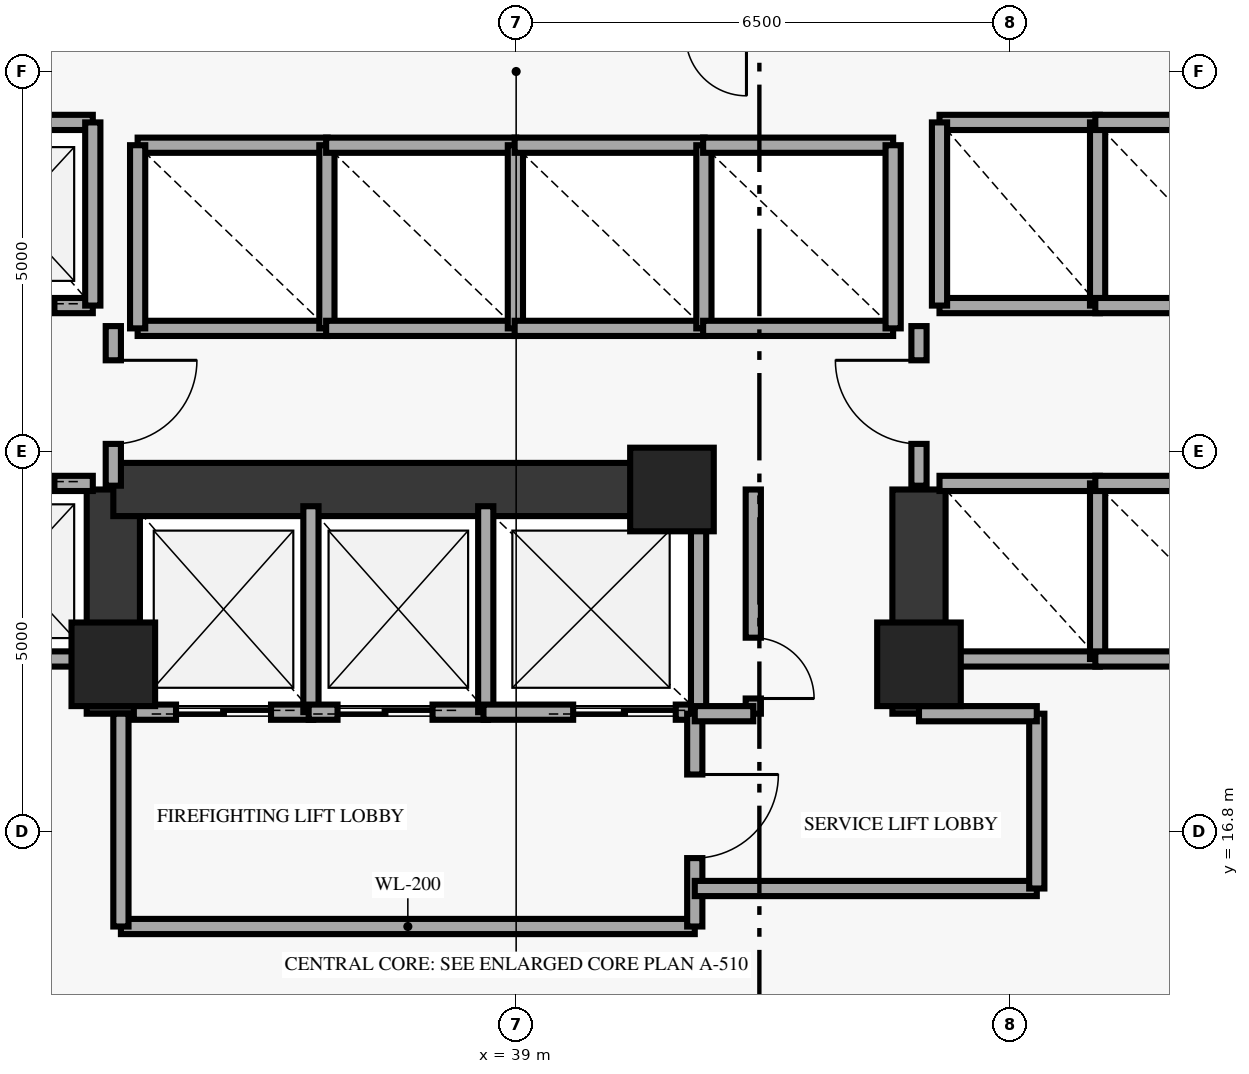
"""IFC4 building model, lengths in metres.
Left out: names, types, materials, properties, quantities, classifications, styles, units other than length and angle.
Written with IfcOpenShell. Run it as: python <this file> out.ifc"""

import sys

from ifc_helpers import new_model, si_unit, direction, frame, frame_2d, origin, origin_2d, place, context, subcontext, project, spatial, rectangle, extrude, element, fill, save


model = new_model("IFC4")
c1 = context("Model", 3, precision=1e-05, world=origin(), true_north=direction((0.0, 1.0)))
c2 = subcontext(c1, "Body", "Model", "MODEL_VIEW")
j1 = project(units=[si_unit("LENGTHUNIT", "METRE"), si_unit("PLANEANGLEUNIT", "RADIAN")], contexts=[c1])
p1 = place(None, origin())
s1 = spatial("IfcSite", under=j1, at=p1, CompositionType="ELEMENT")
p2 = place(p1, origin())
s2 = spatial("IfcBuilding", under=s1, at=p2, CompositionType="ELEMENT")
p3 = place(p2, frame((0.0, 0.0, 102.0)))
s3 = spatial("IfcBuildingStorey", under=s2, at=p3, CompositionType="ELEMENT", Elevation=102.0)
for number, where, z_axis, x_axis in (
    (1, (33.7, 19.0, 0.0), (0.0, 0.0, 1.0), (1.0, 0.0, 0.0)),
    (2, (41.05, 21.3, 0.0), (0.0, 0.0, 1.0), (1.0, 0.0, 0.0)),
    (3, (44.3, 19.0, 0.0), (0.0, 0.0, 1.0), (1.0, 0.0, 0.0)),
):
    element("IfcColumn", number, at=place(p3, frame(where, z_axis=z_axis, x_axis=x_axis)), inside=s3, PredefinedType="PILASTER", context=c2, shape_type="SweptSolid", body=[
        extrude(rectangle(XDim=1.1, YDim=1.1, at=origin_2d()), origin(), (0.0, 0.0, 1.0), 3.7),
    ])
for number, where, z_axis, x_axis in (
    (4, (33.7, 18.35, 0.0), (0.0, 0.0, 1.0), (0.0, 1.0, 0.0)),
    (5, (44.3, 18.35, 0.0), (0.0, 0.0, 1.0), (0.0, 1.0, 0.0)),
):
    element("IfcWall", number, at=place(p3, frame(where, z_axis=z_axis, x_axis=x_axis)), inside=s3, PredefinedType="SHEAR", context=c2, shape_type="SweptSolid", body=[
        extrude(rectangle(XDim=2.95, YDim=0.7, at=frame_2d((1.475, 0.0))), origin(), (0.0, 0.0, 1.0), 3.7),
    ])
p4 = place(p3, frame((33.7, 21.3, 0.0), z_axis=(0.0, 0.0, 1.0), x_axis=(1.0, 0.0, 0.0)))
e6 = element("IfcWall", 6, at=p4, inside=s3, PredefinedType="SHEAR", context=c2, shape_type="SweptSolid", body=[
    extrude(rectangle(XDim=7.55, YDim=0.7, at=frame_2d((3.775, 0.0))), origin(), (0.0, 0.0, 1.0), 3.7),
])
p5 = place(p3, frame((31.32, 23.72, 0.0), z_axis=(0.0, 0.0, 1.0), x_axis=(1.0, 0.0, 0.0)))
e7 = element("IfcWall", 7, at=p5, inside=s3, PredefinedType="SOLIDWALL", context=c2, shape_type="SweptSolid", body=[
    extrude(rectangle(XDim=2.11, YDim=0.2, at=frame_2d((1.055, 0.0))), origin(), (0.0, 0.0, 1.0), 3.7),
])
p6 = place(p5, frame((0.505, 0.0, 0.0)))
e8 = element("IfcOpeningElement", 8, at=p6, cuts=e7, PredefinedType="OPENING", context=c2, shape_type="SweptSolid", body=[
    extrude(rectangle(XDim=1.1, YDim=2.15, at=frame_2d((0.55, 1.075))), frame((0.0, 0.11, 0.0), z_axis=(0.0, -1.0, 0.0), x_axis=(1.0, 0.0, 0.0)), (0.0, 0.0, 1.0), 0.22),
])
p7 = place(p3, frame((31.32, 26.13, 0.0), z_axis=(0.0, 0.0, 1.0), x_axis=(1.0, 0.0, 0.0)))
e9 = element("IfcWall", 9, at=p7, inside=s3, PredefinedType="SOLIDWALL", context=c2, shape_type="SweptSolid", body=[
    extrude(rectangle(XDim=2.11, YDim=0.2, at=frame_2d((1.055, 0.0))), origin(), (0.0, 0.0, 1.0), 3.7),
])
p8 = place(p3, frame((33.43, 23.72, 0.0), z_axis=(0.0, 0.0, 1.0), x_axis=(0.0, 1.0, 0.0)))
e10 = element("IfcWall", 10, at=p8, inside=s3, PredefinedType="SOLIDWALL", context=c2, shape_type="SweptSolid", body=[
    extrude(rectangle(XDim=2.41, YDim=0.2, at=frame_2d((1.205, 0.0))), origin(), (0.0, 0.0, 1.0), 3.7),
])
p9 = place(p3, frame((31.32, 19.07, 0.0), z_axis=(0.0, 0.0, 1.0), x_axis=(1.0, 0.0, 0.0)))
e11 = element("IfcWall", 11, at=p9, inside=s3, PredefinedType="SOLIDWALL", context=c2, shape_type="SweptSolid", body=[
    extrude(rectangle(XDim=2.11, YDim=0.2, at=frame_2d((1.055, 0.0))), origin(), (0.0, 0.0, 1.0), 3.7),
])
p10 = place(p3, frame((31.32, 21.38, 0.0), z_axis=(0.0, 0.0, 1.0), x_axis=(1.0, 0.0, 0.0)))
e12 = element("IfcWall", 12, at=p10, inside=s3, PredefinedType="SOLIDWALL", context=c2, shape_type="SweptSolid", body=[
    extrude(rectangle(XDim=2.11, YDim=0.2, at=frame_2d((1.055, 0.0))), origin(), (0.0, 0.0, 1.0), 3.7),
])
p11 = place(p10, frame((0.505, 0.0, 0.0)))
e13 = element("IfcOpeningElement", 13, at=p11, cuts=e12, PredefinedType="OPENING", context=c2, shape_type="SweptSolid", body=[
    extrude(rectangle(XDim=1.1, YDim=2.15, at=frame_2d((0.55, 1.075))), frame((0.0, 0.11, 0.0), z_axis=(0.0, -1.0, 0.0), x_axis=(1.0, 0.0, 0.0)), (0.0, 0.0, 1.0), 0.22),
])
for number, where, z_axis, x_axis in (
    (14, (44.57, 23.72, 0.0), (0.0, 0.0, 1.0), (1.0, 0.0, 0.0)),
    (15, (44.57, 26.13, 0.0), (0.0, 0.0, 1.0), (1.0, 0.0, 0.0)),
):
    element("IfcWall", number, at=place(p3, frame(where, z_axis=z_axis, x_axis=x_axis)), inside=s3, PredefinedType="SOLIDWALL", context=c2, shape_type="SweptSolid", body=[
        extrude(rectangle(XDim=2.11, YDim=0.2, at=frame_2d((1.055, 0.0))), origin(), (0.0, 0.0, 1.0), 3.7),
    ])
for number, where, z_axis, x_axis in (
    (16, (44.57, 23.72, 0.0), (0.0, 0.0, 1.0), (0.0, 1.0, 0.0)),
    (17, (46.65, 23.72, 0.0), (0.0, 0.0, 1.0), (0.0, 1.0, 0.0)),
):
    element("IfcWall", number, at=place(p3, frame(where, z_axis=z_axis, x_axis=x_axis)), inside=s3, PredefinedType="SOLIDWALL", context=c2, shape_type="SweptSolid", body=[
        extrude(rectangle(XDim=2.41, YDim=0.2, at=frame_2d((1.205, 0.0))), origin(), (0.0, 0.0, 1.0), 3.7),
    ])
for number, where, z_axis, x_axis in (
    (18, (46.62, 23.72, 0.0), (0.0, 0.0, 1.0), (1.0, 0.0, 0.0)),
    (19, (46.62, 26.13, 0.0), (0.0, 0.0, 1.0), (1.0, 0.0, 0.0)),
):
    element("IfcWall", number, at=place(p3, frame(where, z_axis=z_axis, x_axis=x_axis)), inside=s3, PredefinedType="SOLIDWALL", context=c2, shape_type="SweptSolid", body=[
        extrude(rectangle(XDim=2.31, YDim=0.2, at=frame_2d((1.155, 0.0))), origin(), (0.0, 0.0, 1.0), 3.7),
    ])
for number, where, z_axis, x_axis in (
    (20, (44.57, 19.07, 0.0), (0.0, 0.0, 1.0), (1.0, 0.0, 0.0)),
    (21, (44.57, 21.38, 0.0), (0.0, 0.0, 1.0), (1.0, 0.0, 0.0)),
):
    element("IfcWall", number, at=place(p3, frame(where, z_axis=z_axis, x_axis=x_axis)), inside=s3, PredefinedType="SOLIDWALL", context=c2, shape_type="SweptSolid", body=[
        extrude(rectangle(XDim=2.11, YDim=0.2, at=frame_2d((1.055, 0.0))), origin(), (0.0, 0.0, 1.0), 3.7),
    ])
for number, where, z_axis, x_axis in (
    (22, (46.65, 19.07, 0.0), (0.0, 0.0, 1.0), (0.0, 1.0, 0.0)),
    (23, (46.62, 19.07, 0.0), (0.0, 0.0, 1.0), (1.0, 0.0, 0.0)),
    (24, (46.62, 21.38, 0.0), (0.0, 0.0, 1.0), (1.0, 0.0, 0.0)),
):
    element("IfcWall", number, at=place(p3, frame(where, z_axis=z_axis, x_axis=x_axis)), inside=s3, PredefinedType="SOLIDWALL", context=c2, shape_type="SweptSolid", body=[
        extrude(rectangle(XDim=2.31, YDim=0.2, at=frame_2d((1.155, 0.0))), origin(), (0.0, 0.0, 1.0), 3.7),
    ])
for number, where, z_axis, x_axis in (
    (25, (34.02, 23.42, 0.0), (0.0, 0.0, 1.0), (1.0, 0.0, 0.0)),
    (26, (34.02, 25.83, 0.0), (0.0, 0.0, 1.0), (1.0, 0.0, 0.0)),
):
    element("IfcWall", number, at=place(p3, frame(where, z_axis=z_axis, x_axis=x_axis)), inside=s3, PredefinedType="SOLIDWALL", context=c2, shape_type="SweptSolid", body=[
        extrude(rectangle(XDim=2.5, YDim=0.2, at=frame_2d((1.25, 0.0))), origin(), (0.0, 0.0, 1.0), 3.7),
    ])
for number, where, z_axis, x_axis in (
    (27, (34.02, 23.42, 0.0), (0.0, 0.0, 1.0), (0.0, 1.0, 0.0)),
    (28, (36.51, 23.42, 0.0), (0.0, 0.0, 1.0), (0.0, 1.0, 0.0)),
):
    element("IfcWall", number, at=place(p3, frame(where, z_axis=z_axis, x_axis=x_axis)), inside=s3, PredefinedType="SOLIDWALL", context=c2, shape_type="SweptSolid", body=[
        extrude(rectangle(XDim=2.41, YDim=0.2, at=frame_2d((1.205, 0.0))), origin(), (0.0, 0.0, 1.0), 3.7),
    ])
for number, where, z_axis, x_axis in (
    (29, (36.5, 23.42, 0.0), (0.0, 0.0, 1.0), (1.0, 0.0, 0.0)),
    (30, (36.5, 25.83, 0.0), (0.0, 0.0, 1.0), (1.0, 0.0, 0.0)),
):
    element("IfcWall", number, at=place(p3, frame(where, z_axis=z_axis, x_axis=x_axis)), inside=s3, PredefinedType="SOLIDWALL", context=c2, shape_type="SweptSolid", body=[
        extrude(rectangle(XDim=2.5, YDim=0.2, at=frame_2d((1.25, 0.0))), origin(), (0.0, 0.0, 1.0), 3.7),
    ])
p12 = place(p3, frame((38.99, 23.42, 0.0), z_axis=(0.0, 0.0, 1.0), x_axis=(0.0, 1.0, 0.0)))
e31 = element("IfcWall", 31, at=p12, inside=s3, PredefinedType="SOLIDWALL", context=c2, shape_type="SweptSolid", body=[
    extrude(rectangle(XDim=2.41, YDim=0.2, at=frame_2d((1.205, 0.0))), origin(), (0.0, 0.0, 1.0), 3.7),
])
for number, where, z_axis, x_axis in (
    (32, (38.98, 23.42, 0.0), (0.0, 0.0, 1.0), (1.0, 0.0, 0.0)),
    (33, (38.98, 25.83, 0.0), (0.0, 0.0, 1.0), (1.0, 0.0, 0.0)),
):
    element("IfcWall", number, at=place(p3, frame(where, z_axis=z_axis, x_axis=x_axis)), inside=s3, PredefinedType="SOLIDWALL", context=c2, shape_type="SweptSolid", body=[
        extrude(rectangle(XDim=2.5, YDim=0.2, at=frame_2d((1.25, 0.0))), origin(), (0.0, 0.0, 1.0), 3.7),
    ])
p13 = place(p3, frame((41.47, 23.42, 0.0), z_axis=(0.0, 0.0, 1.0), x_axis=(0.0, 1.0, 0.0)))
e34 = element("IfcWall", 34, at=p13, inside=s3, PredefinedType="SOLIDWALL", context=c2, shape_type="SweptSolid", body=[
    extrude(rectangle(XDim=2.41, YDim=0.2, at=frame_2d((1.205, 0.0))), origin(), (0.0, 0.0, 1.0), 3.7),
])
for number, where, z_axis, x_axis in (
    (35, (41.46, 23.42, 0.0), (0.0, 0.0, 1.0), (1.0, 0.0, 0.0)),
    (36, (41.46, 25.83, 0.0), (0.0, 0.0, 1.0), (1.0, 0.0, 0.0)),
):
    element("IfcWall", number, at=place(p3, frame(where, z_axis=z_axis, x_axis=x_axis)), inside=s3, PredefinedType="SOLIDWALL", context=c2, shape_type="SweptSolid", body=[
        extrude(rectangle(XDim=2.5, YDim=0.2, at=frame_2d((1.25, 0.0))), origin(), (0.0, 0.0, 1.0), 3.7),
    ])
p14 = place(p3, frame((43.96, 23.42, 0.0), z_axis=(0.0, 0.0, 1.0), x_axis=(0.0, 1.0, 0.0)))
e37 = element("IfcWall", 37, at=p14, inside=s3, PredefinedType="SOLIDWALL", context=c2, shape_type="SweptSolid", body=[
    extrude(rectangle(XDim=2.41, YDim=0.2, at=frame_2d((1.205, 0.0))), origin(), (0.0, 0.0, 1.0), 3.7),
])
p15 = place(p3, frame((33.97, 18.37, 0.0), z_axis=(0.0, 0.0, 1.0), x_axis=(1.0, 0.0, 0.0)))
e38 = element("IfcWall", 38, at=p15, inside=s3, PredefinedType="SOLIDWALL", context=c2, shape_type="SweptSolid", body=[
    extrude(rectangle(XDim=2.36, YDim=0.2, at=frame_2d((1.18, 0.0))), origin(), (0.0, 0.0, 1.0), 3.7),
])
p16 = place(p15, frame((0.555, 0.0, 0.0)))
e39 = element("IfcOpeningElement", 39, at=p16, cuts=e38, PredefinedType="OPENING", context=c2, shape_type="SweptSolid", body=[
    extrude(rectangle(XDim=1.25, YDim=2.2, at=frame_2d((0.625, 1.1))), frame((0.0, 0.11, 0.0), z_axis=(0.0, -1.0, 0.0), x_axis=(1.0, 0.0, 0.0)), (0.0, 0.0, 1.0), 0.22),
])
p17 = place(p3, frame((36.3, 18.37, 0.0), z_axis=(0.0, 0.0, 1.0), x_axis=(0.0, 1.0, 0.0)))
e40 = element("IfcWall", 40, at=p17, inside=s3, PredefinedType="SOLIDWALL", context=c2, shape_type="SweptSolid", body=[
    extrude(rectangle(XDim=2.71, YDim=0.2, at=frame_2d((1.355, 0.0))), origin(), (0.0, 0.0, 1.0), 3.7),
])
p18 = place(p3, frame((36.27, 18.37, 0.0), z_axis=(0.0, 0.0, 1.0), x_axis=(1.0, 0.0, 0.0)))
e41 = element("IfcWall", 41, at=p18, inside=s3, PredefinedType="SOLIDWALL", context=c2, shape_type="SweptSolid", body=[
    extrude(rectangle(XDim=2.36, YDim=0.2, at=frame_2d((1.18, 0.0))), origin(), (0.0, 0.0, 1.0), 3.7),
])
p19 = place(p18, frame((0.38, 0.0, 0.0)))
e42 = element("IfcOpeningElement", 42, at=p19, cuts=e41, PredefinedType="OPENING", context=c2, shape_type="SweptSolid", body=[
    extrude(rectangle(XDim=1.25, YDim=2.2, at=frame_2d((0.625, 1.1))), frame((0.0, 0.11, 0.0), z_axis=(0.0, -1.0, 0.0), x_axis=(1.0, 0.0, 0.0)), (0.0, 0.0, 1.0), 0.22),
])
p20 = place(p3, frame((38.6, 18.37, 0.0), z_axis=(0.0, 0.0, 1.0), x_axis=(0.0, 1.0, 0.0)))
e43 = element("IfcWall", 43, at=p20, inside=s3, PredefinedType="SOLIDWALL", context=c2, shape_type="SweptSolid", body=[
    extrude(rectangle(XDim=2.71, YDim=0.2, at=frame_2d((1.355, 0.0))), origin(), (0.0, 0.0, 1.0), 3.7),
])
p21 = place(p3, frame((38.57, 18.37, 0.0), z_axis=(0.0, 0.0, 1.0), x_axis=(1.0, 0.0, 0.0)))
e44 = element("IfcWall", 44, at=p21, inside=s3, PredefinedType="SOLIDWALL", context=c2, shape_type="SweptSolid", body=[
    extrude(rectangle(XDim=2.83, YDim=0.2, at=frame_2d((1.415, 0.0))), origin(), (0.0, 0.0, 1.0), 3.7),
])
p22 = place(p21, frame((1.18, 0.0, 0.0)))
e45 = element("IfcOpeningElement", 45, at=p22, cuts=e44, PredefinedType="OPENING", context=c2, shape_type="SweptSolid", body=[
    extrude(rectangle(XDim=1.35, YDim=2.18, at=frame_2d((0.675, 1.09))), frame((0.0, 0.11, 0.0), z_axis=(0.0, -1.0, 0.0), x_axis=(1.0, 0.0, 0.0)), (0.0, 0.0, 1.0), 0.22),
])
p23 = place(p3, frame((41.4, 18.37, 0.0), z_axis=(0.0, 0.0, 1.0), x_axis=(0.0, 1.0, 0.0)))
e46 = element("IfcWall", 46, at=p23, inside=s3, PredefinedType="SOLIDWALL", context=c2, shape_type="SweptSolid", body=[
    extrude(rectangle(XDim=2.71, YDim=0.2, at=frame_2d((1.355, 0.0))), origin(), (0.0, 0.0, 1.0), 3.7),
])
p24 = place(p3, frame((33.7, 21.35, 0.0), z_axis=(0.0, 0.0, 1.0), x_axis=(0.0, 1.0, 0.0)))
e47 = element("IfcWall", 47, at=p24, inside=s3, PredefinedType="SOLIDWALL", context=c2, shape_type="SweptSolid", body=[
    extrude(rectangle(XDim=2.1, YDim=0.2, at=frame_2d((1.05, 0.0))), origin(), (0.0, 0.0, 1.0), 2.92),
])
p25 = place(p24, frame((0.55, 0.0, 0.0)))
e48 = element("IfcOpeningElement", 48, at=p25, cuts=e47, PredefinedType="OPENING", context=c2, shape_type="SweptSolid", body=[
    extrude(rectangle(XDim=1.1, YDim=2.15, at=frame_2d((0.55, 1.075))), frame((0.0, 0.11, 0.0), z_axis=(0.0, -1.0, 0.0), x_axis=(1.0, 0.0, 0.0)), (0.0, 0.0, 1.0), 0.22),
])
p26 = place(p3, frame((44.3, 21.35, 0.0), z_axis=(0.0, 0.0, 1.0), x_axis=(0.0, 1.0, 0.0)))
e49 = element("IfcWall", 49, at=p26, inside=s3, PredefinedType="SOLIDWALL", context=c2, shape_type="SweptSolid", body=[
    extrude(rectangle(XDim=2.1, YDim=0.2, at=frame_2d((1.05, 0.0))), origin(), (0.0, 0.0, 1.0), 2.92),
])
p27 = place(p26, frame((0.55, 0.0, 0.0)))
e50 = element("IfcOpeningElement", 50, at=p27, cuts=e49, PredefinedType="OPENING", context=c2, shape_type="SweptSolid", body=[
    extrude(rectangle(XDim=1.1, YDim=2.15, at=frame_2d((0.55, 1.075))), frame((0.0, 0.11, 0.0), z_axis=(0.0, -1.0, 0.0), x_axis=(1.0, 0.0, 0.0)), (0.0, 0.0, 1.0), 0.22),
])
p28 = place(p3, frame((33.8, 15.55, 0.0), z_axis=(0.0, 0.0, 1.0), x_axis=(1.0, 0.0, 0.0)))
e51 = element("IfcWall", 51, at=p28, inside=s3, PredefinedType="SOLIDWALL", context=c2, shape_type="SweptSolid", body=[
    extrude(rectangle(XDim=7.55, YDim=0.2, at=frame_2d((3.775, 0.0))), origin(), (0.0, 0.0, 1.0), 3.7),
])
p29 = place(p3, frame((33.8, 15.55, 0.0), z_axis=(0.0, 0.0, 1.0), x_axis=(0.0, 1.0, 0.0)))
e52 = element("IfcWall", 52, at=p29, inside=s3, PredefinedType="SOLIDWALL", context=c2, shape_type="SweptSolid", body=[
    extrude(rectangle(XDim=2.8, YDim=0.2, at=frame_2d((1.4, 0.0))), origin(), (0.0, 0.0, 1.0), 3.7),
])
p30 = place(p3, frame((41.35, 15.55, 0.0), z_axis=(0.0, 0.0, 1.0), x_axis=(0.0, 1.0, 0.0)))
e53 = element("IfcWall", 53, at=p30, inside=s3, PredefinedType="SOLIDWALL", context=c2, shape_type="SweptSolid", body=[
    extrude(rectangle(XDim=2.8, YDim=0.2, at=frame_2d((1.4, 0.0))), origin(), (0.0, 0.0, 1.0), 3.7),
])
p31 = place(p30, frame((0.9, 0.0, 0.0)))
e54 = element("IfcOpeningElement", 54, at=p31, cuts=e53, PredefinedType="OPENING", context=c2, shape_type="SweptSolid", body=[
    extrude(rectangle(XDim=1.1, YDim=2.15, at=frame_2d((0.55, 1.075))), frame((0.0, 0.11, 0.0), z_axis=(0.0, -1.0, 0.0), x_axis=(1.0, 0.0, 0.0)), (0.0, 0.0, 1.0), 0.22),
])
p32 = place(p3, frame((41.35, 16.05, 0.0), z_axis=(0.0, 0.0, 1.0), x_axis=(1.0, 0.0, 0.0)))
e55 = element("IfcWall", 55, at=p32, inside=s3, PredefinedType="SOLIDWALL", context=c2, shape_type="SweptSolid", body=[
    extrude(rectangle(XDim=4.5, YDim=0.2, at=frame_2d((2.25, 0.0))), origin(), (0.0, 0.0, 1.0), 3.7),
])
p33 = place(p3, frame((45.85, 16.05, 0.0), z_axis=(0.0, 0.0, 1.0), x_axis=(0.0, 1.0, 0.0)))
e56 = element("IfcWall", 56, at=p33, inside=s3, PredefinedType="SOLIDWALL", context=c2, shape_type="SweptSolid", body=[
    extrude(rectangle(XDim=2.3, YDim=0.2, at=frame_2d((1.15, 0.0))), origin(), (0.0, 0.0, 1.0), 3.7),
])
p34 = place(p3, frame((44.3, 18.35, 0.0), z_axis=(0.0, 0.0, 1.0), x_axis=(1.0, 0.0, 0.0)))
e57 = element("IfcWall", 57, at=p34, inside=s3, PredefinedType="SOLIDWALL", context=c2, shape_type="SweptSolid", body=[
    extrude(rectangle(XDim=1.55, YDim=0.2, at=frame_2d((0.775, 0.0))), origin(), (0.0, 0.0, 1.0), 3.7),
])
p35 = place(p3, frame((42.12, 18.35, 0.0), z_axis=(0.0, 0.0, 1.0), x_axis=(0.0, 1.0, 0.0)))
e58 = element("IfcWall", 58, at=p35, inside=s3, PredefinedType="SOLIDWALL", context=c2, shape_type="SweptSolid", body=[
    extrude(rectangle(XDim=2.95, YDim=0.2, at=frame_2d((1.475, 0.0))), origin(), (0.0, 0.0, 1.0), 3.7),
])
p36 = place(p35, frame((0.2, 0.0, 0.0)))
e59 = element("IfcOpeningElement", 59, at=p36, cuts=e58, PredefinedType="OPENING", context=c2, shape_type="SweptSolid", body=[
    extrude(rectangle(XDim=0.8, YDim=2.05, at=frame_2d((0.4, 1.025))), frame((0.0, 0.11, 0.0), z_axis=(0.0, -1.0, 0.0), x_axis=(1.0, 0.0, 0.0)), (0.0, 0.0, 1.0), 0.22),
])
p37 = place(p3, frame((41.35, 18.35, 0.0), z_axis=(0.0, 0.0, 1.0), x_axis=(1.0, 0.0, 0.0)))
e60 = element("IfcWall", 60, at=p37, inside=s3, PredefinedType="SOLIDWALL", context=c2, shape_type="SweptSolid", body=[
    extrude(rectangle(XDim=0.77, YDim=0.2, at=frame_2d((0.385, 0.0))), origin(), (0.0, 0.0, 1.0), 3.7),
])
p38 = place(p3, frame((46.43, 12.13, 0.0), z_axis=(0.0, 0.0, 1.0), x_axis=(0.752724610228, 0.658335523238, 0.0)))
e61 = element("IfcWall", 61, at=p38, inside=s3, PredefinedType="PARTITIONING", context=c2, shape_type="SweptSolid", body=[
    extrude(rectangle(XDim=4.089, YDim=0.16, at=frame_2d((2.045, 0.0))), origin(), (0.0, 0.0, 1.0), 3.7),
])
p39 = place(p6, origin())
e62 = element("IfcDoor", 62, at=p39, inside=s3, OperationType="DOUBLE_DOOR_SLIDING", PredefinedType="DOOR", context=c2, shape_type="SweptSolid", body=[
    extrude(rectangle(XDim=1.1, YDim=2.15, at=frame_2d((0.55, 1.075))), frame((0.0, 0.025, 0.0), z_axis=(0.0, -1.0, 0.0), x_axis=(1.0, 0.0, 0.0)), (0.0, 0.0, 1.0), 0.05),
])
fill(e8, e62)
p40 = place(p11, origin())
e63 = element("IfcDoor", 63, at=p40, inside=s3, OperationType="DOUBLE_DOOR_SLIDING", PredefinedType="DOOR", context=c2, shape_type="SweptSolid", body=[
    extrude(rectangle(XDim=1.1, YDim=2.15, at=frame_2d((0.55, 1.075))), frame((0.0, 0.025, 0.0), z_axis=(0.0, -1.0, 0.0), x_axis=(1.0, 0.0, 0.0)), (0.0, 0.0, 1.0), 0.05),
])
fill(e13, e63)
p41 = place(p16, origin())
e64 = element("IfcDoor", 64, at=p41, inside=s3, OperationType="DOUBLE_DOOR_SLIDING", PredefinedType="DOOR", context=c2, shape_type="SweptSolid", body=[
    extrude(rectangle(XDim=1.25, YDim=2.2, at=frame_2d((0.625, 1.1))), frame((0.0, 0.025, 0.0), z_axis=(0.0, -1.0, 0.0), x_axis=(1.0, 0.0, 0.0)), (0.0, 0.0, 1.0), 0.05),
])
fill(e39, e64)
p42 = place(p19, origin())
e65 = element("IfcDoor", 65, at=p42, inside=s3, OperationType="DOUBLE_DOOR_SLIDING", PredefinedType="DOOR", context=c2, shape_type="SweptSolid", body=[
    extrude(rectangle(XDim=1.25, YDim=2.2, at=frame_2d((0.625, 1.1))), frame((0.0, 0.025, 0.0), z_axis=(0.0, -1.0, 0.0), x_axis=(1.0, 0.0, 0.0)), (0.0, 0.0, 1.0), 0.05),
])
fill(e42, e65)
p43 = place(p22, origin())
e66 = element("IfcDoor", 66, at=p43, inside=s3, OperationType="DOUBLE_DOOR_SLIDING", PredefinedType="DOOR", context=c2, shape_type="SweptSolid", body=[
    extrude(rectangle(XDim=1.35, YDim=2.18, at=frame_2d((0.675, 1.09))), frame((0.0, 0.025, 0.0), z_axis=(0.0, -1.0, 0.0), x_axis=(1.0, 0.0, 0.0)), (0.0, 0.0, 1.0), 0.05),
])
fill(e45, e66)
p44 = place(p25, origin())
e67 = element("IfcDoor", 67, at=p44, inside=s3, OperationType="SINGLE_SWING_RIGHT", PredefinedType="DOOR", context=c2, shape_type="SweptSolid", body=[
    extrude(rectangle(XDim=1.1, YDim=2.15, at=frame_2d((0.55, 1.075))), frame((0.0, 0.025, 0.0), z_axis=(0.0, -1.0, 0.0), x_axis=(1.0, 0.0, 0.0)), (0.0, 0.0, 1.0), 0.05),
])
fill(e48, e67)
p45 = place(p27, origin())
e68 = element("IfcDoor", 68, at=p45, inside=s3, OperationType="SINGLE_SWING_RIGHT", PredefinedType="DOOR", context=c2, shape_type="SweptSolid", body=[
    extrude(rectangle(XDim=1.1, YDim=2.15, at=frame_2d((0.55, 1.075))), frame((0.0, 0.025, 0.0), z_axis=(0.0, -1.0, 0.0), x_axis=(1.0, 0.0, 0.0)), (0.0, 0.0, 1.0), 0.05),
])
fill(e50, e68)
p46 = place(p31, origin())
e69 = element("IfcDoor", 69, at=p46, inside=s3, OperationType="SINGLE_SWING_RIGHT", PredefinedType="DOOR", context=c2, shape_type="SweptSolid", body=[
    extrude(rectangle(XDim=1.1, YDim=2.15, at=frame_2d((0.55, 1.075))), frame((0.0, 0.025, 0.0), z_axis=(0.0, -1.0, 0.0), x_axis=(1.0, 0.0, 0.0)), (0.0, 0.0, 1.0), 0.05),
])
fill(e54, e69)
p47 = place(p36, origin())
e70 = element("IfcDoor", 70, at=p47, inside=s3, OperationType="SINGLE_SWING_LEFT", PredefinedType="DOOR", context=c2, shape_type="SweptSolid", body=[
    extrude(rectangle(XDim=0.8, YDim=2.05, at=frame_2d((0.4, 1.025))), frame((0.0, 0.025, 0.0), z_axis=(0.0, -1.0, 0.0), x_axis=(1.0, 0.0, 0.0)), (0.0, 0.0, 1.0), 0.05),
])
fill(e59, e70)
save(model, sys.argv[1])
